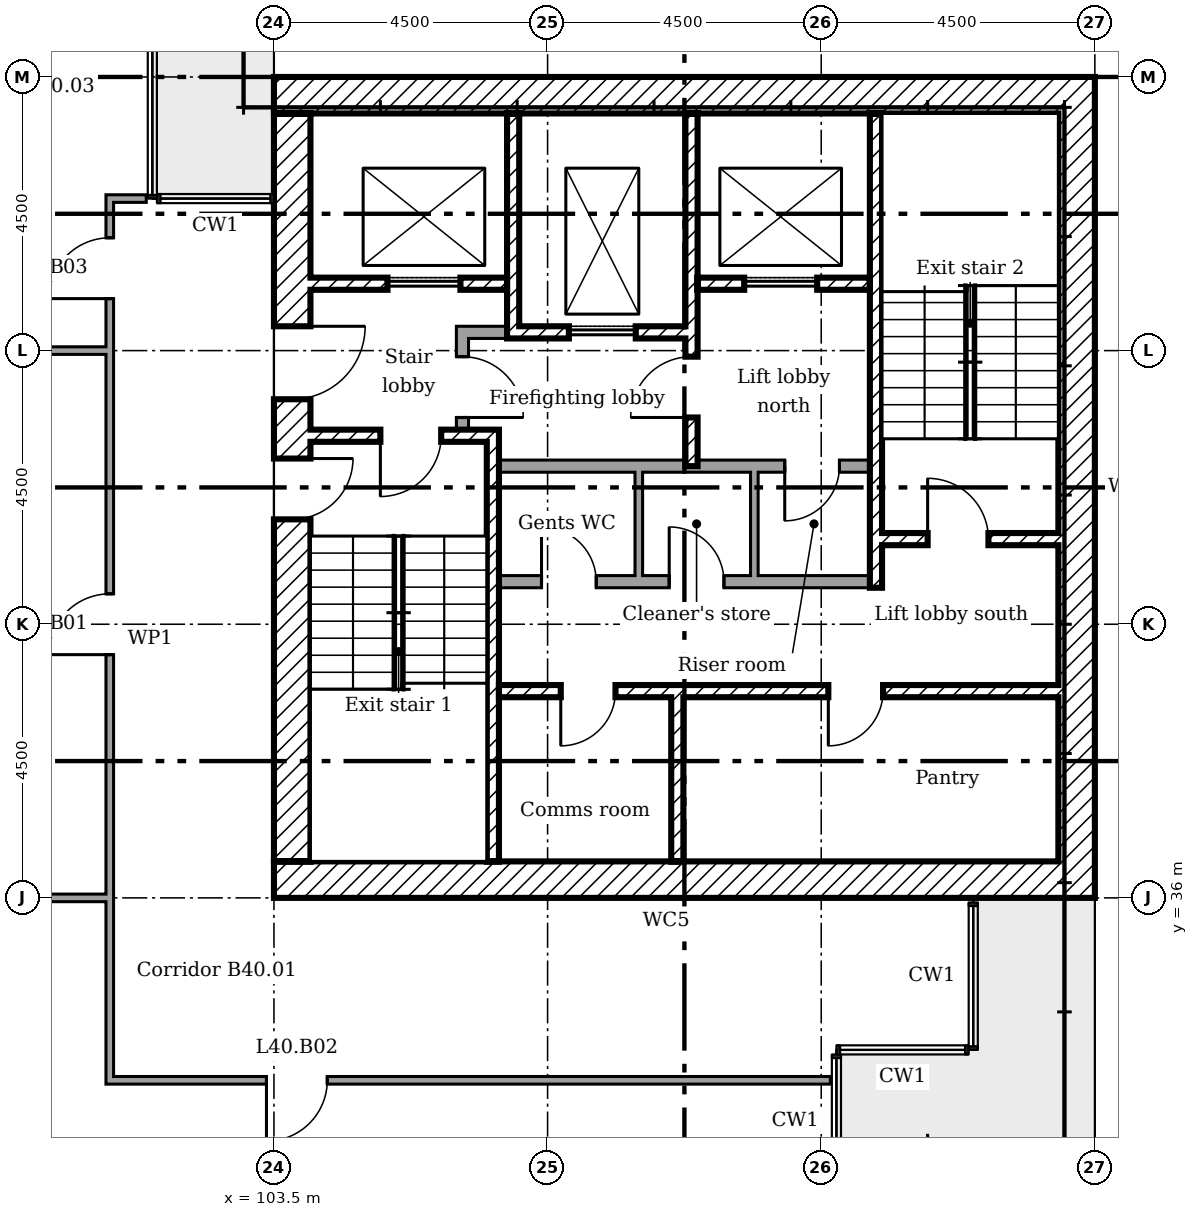
"""IFC4 building model, lengths in metres.
Left out: names, types, materials, properties, quantities, classifications, styles, units other than length and angle.
Written with IfcOpenShell. Run it as: python <this file> out.ifc"""

import sys

from ifc_helpers import new_model, si_unit, direction, frame, frame_2d, origin, place, context, subcontext, project, spatial, rectangle, extrude, element, fill, save


model = new_model("IFC4")
c1 = context("Model", 3, precision=1e-05, world=origin(), true_north=direction((0.0, 1.0)))
c2 = subcontext(c1, "Body", "Model", "MODEL_VIEW")
j1 = project(units=[si_unit("LENGTHUNIT", "METRE"), si_unit("PLANEANGLEUNIT", "RADIAN")], contexts=[c1])
p1 = place(None, origin())
s1 = spatial("IfcSite", under=j1, at=p1, CompositionType="ELEMENT")
p2 = place(p1, origin())
s2 = spatial("IfcBuilding", under=s1, at=p2, CompositionType="ELEMENT")
p3 = place(p2, frame((0.0, 0.0, 161.8)))
s3 = spatial("IfcBuildingStorey", under=s2, at=p3, CompositionType="ELEMENT", Elevation=161.8)
p4 = place(p3, frame((116.7, 36.0, 0.0), z_axis=(0.0, 0.0, 1.0), x_axis=(0.0, 1.0, 0.0)))
e1 = element("IfcWall", 1, at=p4, inside=s3, PredefinedType="SHEAR", context=c2, shape_type="SweptSolid", body=[
    extrude(rectangle(XDim=13.5, YDim=0.6, at=frame_2d((6.75, 0.0))), origin(), (0.0, 0.0, 1.0), 3.35),
])
for number, where in (
    (2, (103.5, 49.2, 0.0)),
    (3, (103.5, 36.3, 0.0)),
):
    element("IfcWall", number, at=place(p3, frame(where)), inside=s3, PredefinedType="SHEAR", context=c2, shape_type="SweptSolid", body=[
        extrude(rectangle(XDim=12.9, YDim=0.6, at=frame_2d((6.45, 0.0))), origin(), (0.0, 0.0, 1.0), 3.35),
    ])
p5 = place(p3, frame((103.8, 36.6, 0.0), z_axis=(0.0, 0.0, 1.0), x_axis=(0.0, 1.0, 0.0)))
e4 = element("IfcWall", 4, at=p5, inside=s3, PredefinedType="SHEAR", context=c2, shape_type="SweptSolid", body=[
    extrude(rectangle(XDim=12.3, YDim=0.6, at=frame_2d((6.15, 0.0))), origin(), (0.0, 0.0, 1.0), 3.35),
])
p6 = place(p5, frame((7.6, 0.0, 0.0)))
e5 = element("IfcOpeningElement", 5, at=p6, cuts=e4, PredefinedType="OPENING", context=c2, shape_type="SweptSolid", body=[
    extrude(rectangle(XDim=1.2, YDim=2.1, at=frame_2d((0.6, 1.05))), frame((0.0, 0.31, 0.0), z_axis=(0.0, -1.0, 0.0), x_axis=(1.0, 0.0, 0.0)), (0.0, 0.0, 1.0), 0.62),
])
p7 = place(p5, frame((5.625, 0.0, 0.0)))
e6 = element("IfcOpeningElement", 6, at=p7, cuts=e4, PredefinedType="OPENING", context=c2, shape_type="SweptSolid", body=[
    extrude(rectangle(XDim=1.0, YDim=2.1, at=frame_2d((0.5, 1.05))), frame((0.0, 0.31, 0.0), z_axis=(0.0, -1.0, 0.0), x_axis=(1.0, 0.0, 0.0)), (0.0, 0.0, 1.0), 0.62),
])
p8 = place(p3, frame((107.433, 48.9, 0.0), z_axis=(0.0, 0.0, 1.0), x_axis=(0.0, -1.0, 0.0)))
e7 = element("IfcWall", 7, at=p8, inside=s3, PredefinedType="SHEAR", context=c2, shape_type="SweptSolid", body=[
    extrude(rectangle(XDim=3.7, YDim=0.2, at=frame_2d((1.85, 0.0))), origin(), (0.0, 0.0, 1.0), 3.35),
])
p9 = place(p3, frame((110.367, 48.9, 0.0), z_axis=(0.0, 0.0, 1.0), x_axis=(0.0, -1.0, 0.0)))
e8 = element("IfcWall", 8, at=p9, inside=s3, PredefinedType="SHEAR", context=c2, shape_type="SweptSolid", body=[
    extrude(rectangle(XDim=5.8, YDim=0.2, at=frame_2d((2.9, 0.0))), origin(), (0.0, 0.0, 1.0), 3.35),
])
p10 = place(p9, frame((4.0, 0.0, 0.0)))
e9 = element("IfcOpeningElement", 9, at=p10, cuts=e8, PredefinedType="OPENING", context=c2, shape_type="SweptSolid", body=[
    extrude(rectangle(XDim=1.0, YDim=2.1, at=frame_2d((0.5, 1.05))), frame((0.0, 0.11, 0.0), z_axis=(0.0, -1.0, 0.0), x_axis=(1.0, 0.0, 0.0)), (0.0, 0.0, 1.0), 0.22),
])
p11 = place(p3, frame((110.133, 36.6, 0.0), z_axis=(0.0, 0.0, 1.0), x_axis=(0.0, 1.0, 0.0)))
e10 = element("IfcWall", 10, at=p11, inside=s3, PredefinedType="SHEAR", context=c2, shape_type="SweptSolid", body=[
    extrude(rectangle(XDim=2.7, YDim=0.2, at=frame_2d((1.35, 0.0))), origin(), (0.0, 0.0, 1.0), 3.35),
])
p12 = place(p3, frame((106.5, 45.3, 0.0)))
e11 = element("IfcWall", 11, at=p12, inside=s3, PredefinedType="PARTITIONING", context=c2, shape_type="SweptSolid", body=[
    extrude(rectangle(XDim=0.833, YDim=0.2, at=frame_2d((0.417, 0.0))), origin(), (0.0, 0.0, 1.0), 3.35),
])
p13 = place(p3, frame((106.6, 43.7, 0.0), z_axis=(0.0, 0.0, 1.0), x_axis=(0.0, 1.0, 0.0)))
e12 = element("IfcWall", 12, at=p13, inside=s3, PredefinedType="PARTITIONING", context=c2, shape_type="SweptSolid", body=[
    extrude(rectangle(XDim=1.5, YDim=0.2, at=frame_2d((0.75, 0.0))), origin(), (0.0, 0.0, 1.0), 3.35),
])
p14 = place(p13, frame((0.2, 0.0, 0.0)))
e13 = element("IfcOpeningElement", 13, at=p14, cuts=e12, PredefinedType="OPENING", context=c2, shape_type="SweptSolid", body=[
    extrude(rectangle(XDim=1.0, YDim=2.1, at=frame_2d((0.5, 1.05))), frame((0.0, 0.11, 0.0), z_axis=(0.0, -1.0, 0.0), x_axis=(1.0, 0.0, 0.0)), (0.0, 0.0, 1.0), 0.22),
])
p15 = place(p3, frame((104.1, 46.1, 0.0)))
e14 = element("IfcWall", 14, at=p15, inside=s3, PredefinedType="SHEAR", context=c2, shape_type="SweptSolid", body=[
    extrude(rectangle(XDim=3.233, YDim=0.2, at=frame_2d((1.617, 0.0))), origin(), (0.0, 0.0, 1.0), 3.35),
])
p16 = place(p15, frame((1.267, 0.0, 0.0)))
e15 = element("IfcOpeningElement", 15, at=p16, cuts=e14, PredefinedType="OPENING", context=c2, shape_type="SweptSolid", body=[
    extrude(rectangle(XDim=1.2, YDim=2.1, at=frame_2d((0.6, 1.05))), frame((0.0, 0.11, 0.0), z_axis=(0.0, -1.0, 0.0), x_axis=(1.0, 0.0, 0.0)), (0.0, 0.0, 1.0), 0.22),
])
p17 = place(p3, frame((110.467, 46.1, 0.0)))
e16 = element("IfcWall", 16, at=p17, inside=s3, PredefinedType="SHEAR", context=c2, shape_type="SweptSolid", body=[
    extrude(rectangle(XDim=2.833, YDim=0.2, at=frame_2d((1.417, 0.0))), origin(), (0.0, 0.0, 1.0), 3.35),
])
p18 = place(p17, frame((0.767, 0.0, 0.0)))
e17 = element("IfcOpeningElement", 17, at=p18, cuts=e16, PredefinedType="OPENING", context=c2, shape_type="SweptSolid", body=[
    extrude(rectangle(XDim=1.2, YDim=2.1, at=frame_2d((0.6, 1.05))), frame((0.0, 0.11, 0.0), z_axis=(0.0, -1.0, 0.0), x_axis=(1.0, 0.0, 0.0)), (0.0, 0.0, 1.0), 0.22),
])
p19 = place(p3, frame((107.533, 45.3, 0.0)))
e18 = element("IfcWall", 18, at=p19, inside=s3, PredefinedType="SHEAR", context=c2, shape_type="SweptSolid", body=[
    extrude(rectangle(XDim=2.733, YDim=0.2, at=frame_2d((1.367, 0.0))), origin(), (0.0, 0.0, 1.0), 3.35),
])
p20 = place(p19, frame((0.817, 0.0, 0.0)))
e19 = element("IfcOpeningElement", 19, at=p20, cuts=e18, PredefinedType="OPENING", context=c2, shape_type="SweptSolid", body=[
    extrude(rectangle(XDim=1.1, YDim=2.1, at=frame_2d((0.55, 1.05))), frame((0.0, 0.11, 0.0), z_axis=(0.0, -1.0, 0.0), x_axis=(1.0, 0.0, 0.0)), (0.0, 0.0, 1.0), 0.22),
])
p21 = place(p3, frame((107.2, 39.4, 0.0)))
e20 = element("IfcWall", 20, at=p21, inside=s3, PredefinedType="SHEAR", context=c2, shape_type="SweptSolid", body=[
    extrude(rectangle(XDim=9.2, YDim=0.2, at=frame_2d((4.6, 0.0))), origin(), (0.0, 0.0, 1.0), 3.35),
])
p22 = place(p21, frame((1.017, 0.0, 0.0)))
e21 = element("IfcOpeningElement", 21, at=p22, cuts=e20, PredefinedType="OPENING", context=c2, shape_type="SweptSolid", body=[
    extrude(rectangle(XDim=0.9, YDim=2.1, at=frame_2d((0.45, 1.05))), frame((0.0, 0.11, 0.0), z_axis=(0.0, -1.0, 0.0), x_axis=(1.0, 0.0, 0.0)), (0.0, 0.0, 1.0), 0.22),
])
p23 = place(p21, frame((5.417, 0.0, 0.0)))
e22 = element("IfcOpeningElement", 22, at=p23, cuts=e20, PredefinedType="OPENING", context=c2, shape_type="SweptSolid", body=[
    extrude(rectangle(XDim=0.9, YDim=2.1, at=frame_2d((0.45, 1.05))), frame((0.0, 0.11, 0.0), z_axis=(0.0, -1.0, 0.0), x_axis=(1.0, 0.0, 0.0)), (0.0, 0.0, 1.0), 0.22),
])
p24 = place(p3, frame((107.1, 36.6, 0.0), z_axis=(0.0, 0.0, 1.0), x_axis=(0.0, 1.0, 0.0)))
e23 = element("IfcWall", 23, at=p24, inside=s3, PredefinedType="SHEAR", context=c2, shape_type="SweptSolid", body=[
    extrude(rectangle(XDim=7.1, YDim=0.2, at=frame_2d((3.55, 0.0))), origin(), (0.0, 0.0, 1.0), 3.35),
])
p25 = place(p3, frame((104.1, 43.6, 0.0)))
e24 = element("IfcWall", 24, at=p25, inside=s3, PredefinedType="SHEAR", context=c2, shape_type="SweptSolid", body=[
    extrude(rectangle(XDim=2.9, YDim=0.2, at=frame_2d((1.45, 0.0))), origin(), (0.0, 0.0, 1.0), 3.35),
])
p26 = place(p25, frame((1.15, 0.0, 0.0)))
e25 = element("IfcOpeningElement", 25, at=p26, cuts=e24, PredefinedType="OPENING", context=c2, shape_type="SweptSolid", body=[
    extrude(rectangle(XDim=1.0, YDim=2.1, at=frame_2d((0.5, 1.05))), frame((0.0, 0.11, 0.0), z_axis=(0.0, -1.0, 0.0), x_axis=(1.0, 0.0, 0.0)), (0.0, 0.0, 1.0), 0.22),
])
p27 = place(p3, frame((113.5, 41.9, 0.0)))
e26 = element("IfcWall", 26, at=p27, inside=s3, PredefinedType="SHEAR", context=c2, shape_type="SweptSolid", body=[
    extrude(rectangle(XDim=2.9, YDim=0.2, at=frame_2d((1.45, 0.0))), origin(), (0.0, 0.0, 1.0), 3.35),
])
p28 = place(p27, frame((0.75, 0.0, 0.0)))
e27 = element("IfcOpeningElement", 27, at=p28, cuts=e26, PredefinedType="OPENING", context=c2, shape_type="SweptSolid", body=[
    extrude(rectangle(XDim=1.0, YDim=2.1, at=frame_2d((0.5, 1.05))), frame((0.0, 0.11, 0.0), z_axis=(0.0, -1.0, 0.0), x_axis=(1.0, 0.0, 0.0)), (0.0, 0.0, 1.0), 0.22),
])
p29 = place(p3, frame((113.4, 41.1, 0.0), z_axis=(0.0, 0.0, 1.0), x_axis=(0.0, 1.0, 0.0)))
e28 = element("IfcWall", 28, at=p29, inside=s3, PredefinedType="SHEAR", context=c2, shape_type="SweptSolid", body=[
    extrude(rectangle(XDim=7.8, YDim=0.2, at=frame_2d((3.9, 0.0))), origin(), (0.0, 0.0, 1.0), 3.35),
])
p30 = place(p3, frame((107.2, 43.1, 0.0)))
e29 = element("IfcWall", 29, at=p30, inside=s3, PredefinedType="PARTITIONING", context=c2, shape_type="SweptSolid", body=[
    extrude(rectangle(XDim=6.1, YDim=0.2, at=frame_2d((3.05, 0.0))), origin(), (0.0, 0.0, 1.0), 3.35),
])
p31 = place(p30, frame((4.7, 0.0, 0.0)))
e30 = element("IfcOpeningElement", 30, at=p31, cuts=e29, PredefinedType="OPENING", context=c2, shape_type="SweptSolid", body=[
    extrude(rectangle(XDim=0.9, YDim=2.1, at=frame_2d((0.45, 1.05))), frame((0.0, 0.11, 0.0), z_axis=(0.0, -1.0, 0.0), x_axis=(1.0, 0.0, 0.0)), (0.0, 0.0, 1.0), 0.22),
])
p32 = place(p3, frame((107.2, 41.2, 0.0)))
e31 = element("IfcWall", 31, at=p32, inside=s3, PredefinedType="PARTITIONING", context=c2, shape_type="SweptSolid", body=[
    extrude(rectangle(XDim=6.1, YDim=0.2, at=frame_2d((3.05, 0.0))), origin(), (0.0, 0.0, 1.0), 3.35),
])
p33 = place(p32, frame((0.7, 0.0, 0.0)))
e32 = element("IfcOpeningElement", 32, at=p33, cuts=e31, PredefinedType="OPENING", context=c2, shape_type="SweptSolid", body=[
    extrude(rectangle(XDim=0.9, YDim=2.1, at=frame_2d((0.45, 1.05))), frame((0.0, 0.11, 0.0), z_axis=(0.0, -1.0, 0.0), x_axis=(1.0, 0.0, 0.0)), (0.0, 0.0, 1.0), 0.22),
])
p34 = place(p32, frame((2.8, 0.0, 0.0)))
e33 = element("IfcOpeningElement", 33, at=p34, cuts=e31, PredefinedType="OPENING", context=c2, shape_type="SweptSolid", body=[
    extrude(rectangle(XDim=0.9, YDim=2.1, at=frame_2d((0.45, 1.05))), frame((0.0, 0.11, 0.0), z_axis=(0.0, -1.0, 0.0), x_axis=(1.0, 0.0, 0.0)), (0.0, 0.0, 1.0), 0.22),
])
for number, where, z_axis, x_axis in (
    (34, (109.5, 41.3, 0.0), (0.0, 0.0, 1.0), (0.0, 1.0, 0.0)),
    (35, (111.4, 41.3, 0.0), (0.0, 0.0, 1.0), (0.0, 1.0, 0.0)),
):
    element("IfcWall", number, at=place(p3, frame(where, z_axis=z_axis, x_axis=x_axis)), inside=s3, PredefinedType="PARTITIONING", context=c2, shape_type="SweptSolid", body=[
        extrude(rectangle(XDim=1.7, YDim=0.125, at=frame_2d((0.85, 0.0))), origin(), (0.0, 0.0, 1.0), 3.35),
    ])
p35 = place(p3, frame((100.738, 33.0, 0.0)))
e36 = element("IfcWall", 36, at=p35, inside=s3, PredefinedType="PARTITIONING", context=c2, shape_type="SweptSolid", body=[
    extrude(rectangle(XDim=11.912, YDim=0.125, at=frame_2d((5.956, 0.0))), origin(), (0.0, 0.0, 1.0), 3.45),
])
p36 = place(p35, frame((2.639, 0.0, 0.0)))
e37 = element("IfcOpeningElement", 37, at=p36, cuts=e36, PredefinedType="OPENING", context=c2, shape_type="SweptSolid", body=[
    extrude(rectangle(XDim=1.0, YDim=2.1, at=frame_2d((0.5, 1.05))), frame((0.0, 0.073, 0.0), z_axis=(0.0, -1.0, 0.0), x_axis=(1.0, 0.0, 0.0)), (0.0, 0.0, 1.0), 0.145),
])
p37 = place(p3, frame((99.35, 36.0, 0.0)))
e38 = element("IfcWall", 38, at=p37, inside=s3, PredefinedType="PARTITIONING", context=c2, shape_type="SweptSolid", body=[
    extrude(rectangle(XDim=1.45, YDim=0.125, at=frame_2d((0.725, 0.0))), origin(), (0.0, 0.0, 1.0), 2.842),
])
p38 = place(p3, frame((96.6, 45.0, 0.0)))
e39 = element("IfcWall", 39, at=p38, inside=s3, PredefinedType="PARTITIONING", context=c2, shape_type="SweptSolid", body=[
    extrude(rectangle(XDim=4.2, YDim=0.125, at=frame_2d((2.1, 0.0))), origin(), (0.0, 0.0, 1.0), 2.851),
])
p39 = place(p3, frame((100.738, 47.5, 0.0)))
e40 = element("IfcWall", 40, at=p39, inside=s3, PredefinedType="PARTITIONING", context=c2, shape_type="SweptSolid", body=[
    extrude(rectangle(XDim=0.662, YDim=0.125, at=frame_2d((0.331, 0.0))), origin(), (0.0, 0.0, 1.0), 3.45),
])
p40 = place(p3, frame((100.8, 33.062, 0.0), z_axis=(0.0, 0.0, 1.0), x_axis=(0.0, 1.0, 0.0)))
e41 = element("IfcWall", 41, at=p40, inside=s3, PredefinedType="PARTITIONING", context=c2, shape_type="SweptSolid", body=[
    extrude(rectangle(XDim=14.375, YDim=0.125, at=frame_2d((7.188, 0.0))), origin(), (0.0, 0.0, 1.0), 3.45),
])
p41 = place(p40, frame((6.938, 0.0, 0.0)))
e42 = element("IfcOpeningElement", 42, at=p41, cuts=e41, PredefinedType="OPENING", context=c2, shape_type="SweptSolid", body=[
    extrude(rectangle(XDim=1.0, YDim=2.1, at=frame_2d((0.5, 1.05))), frame((0.0, 0.073, 0.0), z_axis=(0.0, -1.0, 0.0), x_axis=(1.0, 0.0, 0.0)), (0.0, 0.0, 1.0), 0.145),
])
p42 = place(p40, frame((12.792, 0.0, 0.0)))
e43 = element("IfcOpeningElement", 43, at=p42, cuts=e41, PredefinedType="OPENING", context=c2, shape_type="SweptSolid", body=[
    extrude(rectangle(XDim=1.0, YDim=2.1, at=frame_2d((0.5, 1.05))), frame((0.0, 0.073, 0.0), z_axis=(0.0, -1.0, 0.0), x_axis=(1.0, 0.0, 0.0)), (0.0, 0.0, 1.0), 0.145),
])
p43 = place(p6, frame((1.2, 0.0, 0.0), x_axis=(-1.0, 0.0, 0.0)))
e44 = element("IfcDoor", 44, at=p43, inside=s3, OperationType="SINGLE_SWING_RIGHT", PredefinedType="DOOR", context=c2, shape_type="SweptSolid", body=[
    extrude(rectangle(XDim=1.2, YDim=2.1, at=frame_2d((0.6, 1.05))), frame((0.0, 0.025, 0.0), z_axis=(0.0, -1.0, 0.0), x_axis=(1.0, 0.0, 0.0)), (0.0, 0.0, 1.0), 0.05),
])
fill(e5, e44)
p44 = place(p26, frame((1.0, 0.0, 0.0), x_axis=(-1.0, 0.0, 0.0)))
e45 = element("IfcDoor", 45, at=p44, inside=s3, OperationType="SINGLE_SWING_LEFT", PredefinedType="DOOR", context=c2, shape_type="SweptSolid", body=[
    extrude(rectangle(XDim=1.0, YDim=2.1, at=frame_2d((0.5, 1.05))), frame((0.0, 0.025, 0.0), z_axis=(0.0, -1.0, 0.0), x_axis=(1.0, 0.0, 0.0)), (0.0, 0.0, 1.0), 0.05),
])
fill(e25, e45)
p45 = place(p7, frame((1.0, 0.0, 0.0), x_axis=(-1.0, 0.0, 0.0)))
e46 = element("IfcDoor", 46, at=p45, inside=s3, OperationType="SINGLE_SWING_RIGHT", PredefinedType="DOOR", context=c2, shape_type="SweptSolid", body=[
    extrude(rectangle(XDim=1.0, YDim=2.1, at=frame_2d((0.5, 1.05))), frame((0.0, 0.025, 0.0), z_axis=(0.0, -1.0, 0.0), x_axis=(1.0, 0.0, 0.0)), (0.0, 0.0, 1.0), 0.05),
])
fill(e6, e46)
p46 = place(p28, origin())
e47 = element("IfcDoor", 47, at=p46, inside=s3, OperationType="SINGLE_SWING_RIGHT", PredefinedType="DOOR", context=c2, shape_type="SweptSolid", body=[
    extrude(rectangle(XDim=1.0, YDim=2.1, at=frame_2d((0.5, 1.05))), frame((0.0, 0.025, 0.0), z_axis=(0.0, -1.0, 0.0), x_axis=(1.0, 0.0, 0.0)), (0.0, 0.0, 1.0), 0.05),
])
fill(e27, e47)
p47 = place(p10, frame((1.0, 0.0, 0.0), x_axis=(-1.0, 0.0, 0.0)))
e48 = element("IfcDoor", 48, at=p47, inside=s3, OperationType="SINGLE_SWING_RIGHT", PredefinedType="DOOR", context=c2, shape_type="SweptSolid", body=[
    extrude(rectangle(XDim=1.0, YDim=2.1, at=frame_2d((0.5, 1.05))), frame((0.0, 0.025, 0.0), z_axis=(0.0, -1.0, 0.0), x_axis=(1.0, 0.0, 0.0)), (0.0, 0.0, 1.0), 0.05),
])
fill(e9, e48)
p48 = place(p14, frame((1.0, 0.0, 0.0), x_axis=(-1.0, 0.0, 0.0)))
e49 = element("IfcDoor", 49, at=p48, inside=s3, OperationType="SINGLE_SWING_LEFT", PredefinedType="DOOR", context=c2, shape_type="SweptSolid", body=[
    extrude(rectangle(XDim=1.0, YDim=2.1, at=frame_2d((0.5, 1.05))), frame((0.0, 0.025, 0.0), z_axis=(0.0, -1.0, 0.0), x_axis=(1.0, 0.0, 0.0)), (0.0, 0.0, 1.0), 0.05),
])
fill(e13, e49)
p49 = place(p22, frame((0.9, 0.0, 0.0), x_axis=(-1.0, 0.0, 0.0)))
e50 = element("IfcDoor", 50, at=p49, inside=s3, OperationType="SINGLE_SWING_LEFT", PredefinedType="DOOR", context=c2, shape_type="SweptSolid", body=[
    extrude(rectangle(XDim=0.9, YDim=2.1, at=frame_2d((0.45, 1.05))), frame((0.0, 0.025, 0.0), z_axis=(0.0, -1.0, 0.0), x_axis=(1.0, 0.0, 0.0)), (0.0, 0.0, 1.0), 0.05),
])
fill(e21, e50)
p50 = place(p23, frame((0.9, 0.0, 0.0), x_axis=(-1.0, 0.0, 0.0)))
e51 = element("IfcDoor", 51, at=p50, inside=s3, OperationType="SINGLE_SWING_LEFT", PredefinedType="DOOR", context=c2, shape_type="SweptSolid", body=[
    extrude(rectangle(XDim=0.9, YDim=2.1, at=frame_2d((0.45, 1.05))), frame((0.0, 0.025, 0.0), z_axis=(0.0, -1.0, 0.0), x_axis=(1.0, 0.0, 0.0)), (0.0, 0.0, 1.0), 0.05),
])
fill(e22, e51)
p51 = place(p33, origin())
e52 = element("IfcDoor", 52, at=p51, inside=s3, OperationType="SINGLE_SWING_RIGHT", PredefinedType="DOOR", context=c2, shape_type="SweptSolid", body=[
    extrude(rectangle(XDim=0.9, YDim=2.1, at=frame_2d((0.45, 1.05))), frame((0.0, 0.025, 0.0), z_axis=(0.0, -1.0, 0.0), x_axis=(1.0, 0.0, 0.0)), (0.0, 0.0, 1.0), 0.05),
])
fill(e32, e52)
p52 = place(p34, origin())
e53 = element("IfcDoor", 53, at=p52, inside=s3, OperationType="SINGLE_SWING_RIGHT", PredefinedType="DOOR", context=c2, shape_type="SweptSolid", body=[
    extrude(rectangle(XDim=0.9, YDim=2.1, at=frame_2d((0.45, 1.05))), frame((0.0, 0.025, 0.0), z_axis=(0.0, -1.0, 0.0), x_axis=(1.0, 0.0, 0.0)), (0.0, 0.0, 1.0), 0.05),
])
fill(e33, e53)
p53 = place(p31, frame((0.9, 0.0, 0.0), x_axis=(-1.0, 0.0, 0.0)))
e54 = element("IfcDoor", 54, at=p53, inside=s3, OperationType="SINGLE_SWING_LEFT", PredefinedType="DOOR", context=c2, shape_type="SweptSolid", body=[
    extrude(rectangle(XDim=0.9, YDim=2.1, at=frame_2d((0.45, 1.05))), frame((0.0, 0.025, 0.0), z_axis=(0.0, -1.0, 0.0), x_axis=(1.0, 0.0, 0.0)), (0.0, 0.0, 1.0), 0.05),
])
fill(e30, e54)
p54 = place(p20, origin())
e55 = element("IfcDoor", 55, at=p54, inside=s3, OperationType="SLIDING_TO_LEFT", PredefinedType="DOOR", context=c2, shape_type="SweptSolid", body=[
    extrude(rectangle(XDim=1.1, YDim=2.1, at=frame_2d((0.55, 1.05))), frame((0.0, 0.025, 0.0), z_axis=(0.0, -1.0, 0.0), x_axis=(1.0, 0.0, 0.0)), (0.0, 0.0, 1.0), 0.05),
])
fill(e19, e55)
p55 = place(p16, origin())
e56 = element("IfcDoor", 56, at=p55, inside=s3, OperationType="SLIDING_TO_LEFT", PredefinedType="DOOR", context=c2, shape_type="SweptSolid", body=[
    extrude(rectangle(XDim=1.2, YDim=2.1, at=frame_2d((0.6, 1.05))), frame((0.0, 0.025, 0.0), z_axis=(0.0, -1.0, 0.0), x_axis=(1.0, 0.0, 0.0)), (0.0, 0.0, 1.0), 0.05),
])
fill(e15, e56)
p56 = place(p18, origin())
e57 = element("IfcDoor", 57, at=p56, inside=s3, OperationType="SLIDING_TO_LEFT", PredefinedType="DOOR", context=c2, shape_type="SweptSolid", body=[
    extrude(rectangle(XDim=1.2, YDim=2.1, at=frame_2d((0.6, 1.05))), frame((0.0, 0.025, 0.0), z_axis=(0.0, -1.0, 0.0), x_axis=(1.0, 0.0, 0.0)), (0.0, 0.0, 1.0), 0.05),
])
fill(e17, e57)
p57 = place(p41, origin())
e58 = element("IfcDoor", 58, at=p57, inside=s3, OperationType="SINGLE_SWING_RIGHT", PredefinedType="DOOR", context=c2, shape_type="SweptSolid", body=[
    extrude(rectangle(XDim=1.0, YDim=2.1, at=frame_2d((0.5, 1.05))), frame((0.0, 0.025, 0.0), z_axis=(0.0, -1.0, 0.0), x_axis=(1.0, 0.0, 0.0)), (0.0, 0.0, 1.0), 0.05),
])
fill(e42, e58)
p58 = place(p36, frame((1.0, 0.0, 0.0), x_axis=(-1.0, 0.0, 0.0)))
e59 = element("IfcDoor", 59, at=p58, inside=s3, OperationType="SINGLE_SWING_LEFT", PredefinedType="DOOR", context=c2, shape_type="SweptSolid", body=[
    extrude(rectangle(XDim=1.0, YDim=2.1, at=frame_2d((0.5, 1.05))), frame((0.0, 0.025, 0.0), z_axis=(0.0, -1.0, 0.0), x_axis=(1.0, 0.0, 0.0)), (0.0, 0.0, 1.0), 0.05),
])
fill(e37, e59)
p59 = place(p42, origin())
e60 = element("IfcDoor", 60, at=p59, inside=s3, OperationType="SINGLE_SWING_RIGHT", PredefinedType="DOOR", context=c2, shape_type="SweptSolid", body=[
    extrude(rectangle(XDim=1.0, YDim=2.1, at=frame_2d((0.5, 1.05))), frame((0.0, 0.025, 0.0), z_axis=(0.0, -1.0, 0.0), x_axis=(1.0, 0.0, 0.0)), (0.0, 0.0, 1.0), 0.05),
])
fill(e43, e60)
save(model, sys.argv[1])
